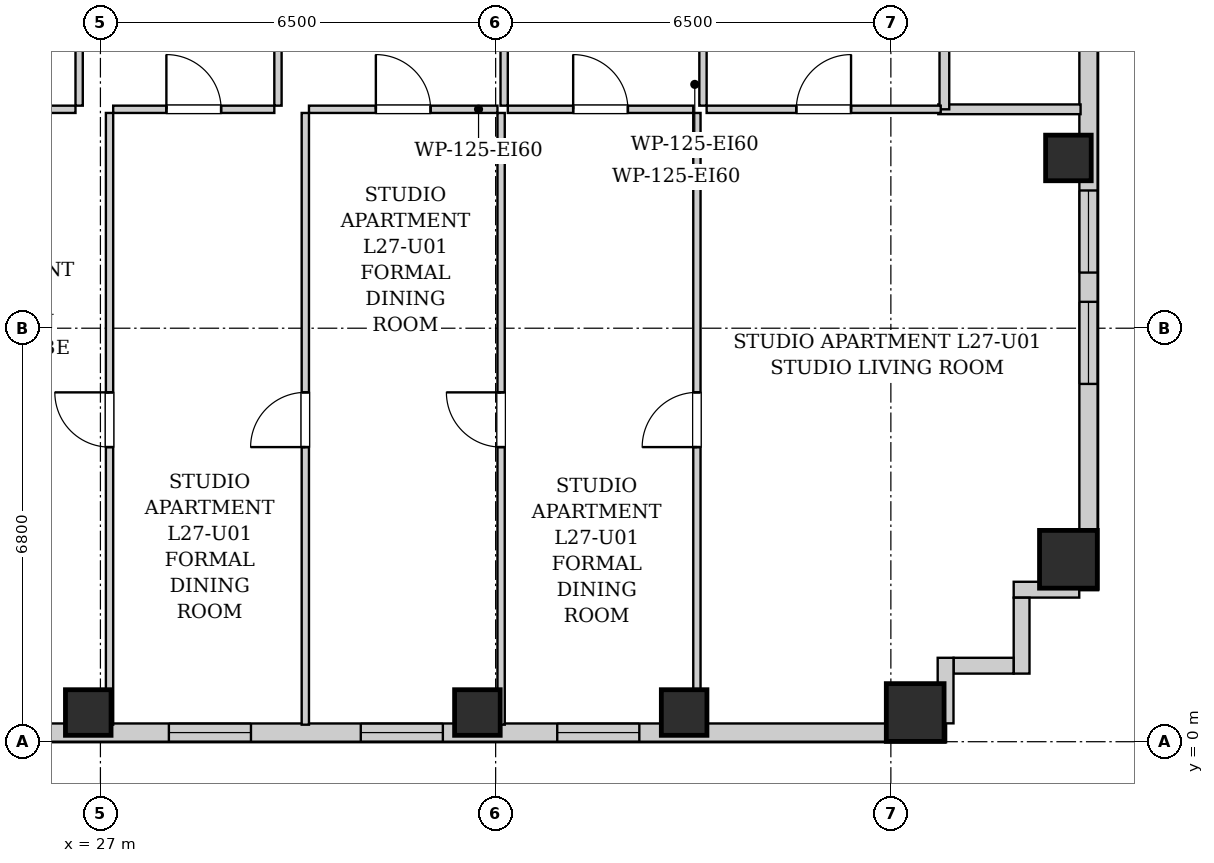
"""IFC4 building model, lengths in metres.
Left out: names, types, materials, properties, quantities, classifications, styles, units other than length and angle.
Written with IfcOpenShell. Run it as: python <this file> out.ifc"""

import sys

from ifc_helpers import new_model, si_unit, direction, frame, frame_2d, origin, origin_2d, place, context, subcontext, project, spatial, rectangle, extrude, element, fill, save


model = new_model("IFC4")
c1 = context("Model", 3, precision=1e-05, world=origin(), true_north=direction((0.0, 1.0)))
c2 = subcontext(c1, "Body", "Model", "MODEL_VIEW")
j1 = project(units=[si_unit("LENGTHUNIT", "METRE"), si_unit("PLANEANGLEUNIT", "RADIAN")], contexts=[c1])
p1 = place(None, origin())
s1 = spatial("IfcSite", under=j1, at=p1, CompositionType="ELEMENT")
p2 = place(p1, origin())
s2 = spatial("IfcBuilding", under=s1, at=p2, CompositionType="ELEMENT")
p3 = place(p2, frame((0.0, 0.0, 97.5)))
s3 = spatial("IfcBuildingStorey", under=s2, at=p3, CompositionType="ELEMENT", Elevation=97.5)
for number, where, z_axis, x_axis in (
    (1, (26.8, 0.48, 0.0), (0.0, 0.0, 1.0), (1.0, 0.0, 0.0)),
    (2, (33.2, 0.48, 0.0), (0.0, 0.0, 1.0), (1.0, 0.0, 0.0)),
    (3, (36.6, 0.48, 0.0), (0.0, 0.0, 1.0), (1.0, 0.0, 0.0)),
):
    element("IfcColumn", number, at=place(p3, frame(where, z_axis=z_axis, x_axis=x_axis)), inside=s3, PredefinedType="COLUMN", context=c2, shape_type="SweptSolid", body=[
        extrude(rectangle(XDim=0.75, YDim=0.75, at=origin_2d()), origin(), (0.0, 0.0, 1.0), 3.2),
    ])
for number, where, z_axis, x_axis in (
    (4, (40.4, 0.48, 0.0), (0.0, 0.0, 1.0), (1.0, 0.0, 0.0)),
    (5, (42.92, 3.0, 0.0), (0.0, 0.0, 1.0), (1.0, 0.0, 0.0)),
):
    element("IfcColumn", number, at=place(p3, frame(where, z_axis=z_axis, x_axis=x_axis)), inside=s3, PredefinedType="COLUMN", context=c2, shape_type="SweptSolid", body=[
        extrude(rectangle(XDim=0.95, YDim=0.95, at=origin_2d()), origin(), (0.0, 0.0, 1.0), 3.2),
    ])
p4 = place(p3, frame((42.92, 9.6, 0.0), z_axis=(0.0, 0.0, 1.0), x_axis=(1.0, 0.0, 0.0)))
e6 = element("IfcColumn", 6, at=p4, inside=s3, PredefinedType="COLUMN", context=c2, shape_type="SweptSolid", body=[
    extrude(rectangle(XDim=0.75, YDim=0.75, at=origin_2d()), origin(), (0.0, 0.0, 1.0), 3.2),
])
p5 = place(p3, frame((43.25, 24.6, 0.0), z_axis=(0.0, 0.0, 1.0), x_axis=(0.0, -1.0, 0.0)))
e7 = element("IfcWall", 7, at=p5, inside=s3, PredefinedType="SOLIDWALL", context=c2, shape_type="SweptSolid", body=[
    extrude(rectangle(XDim=22.1, YDim=0.3, at=frame_2d((11.05, 0.0))), origin(), (0.0, 0.0, 1.0), 2.94),
])
p6 = place(p5, frame((17.366, 0.0, 0.55)))
e8 = element("IfcOpeningElement", 8, at=p6, cuts=e7, PredefinedType="OPENING", context=c2, shape_type="SweptSolid", body=[
    extrude(rectangle(XDim=1.35, YDim=1.2, at=frame_2d((0.675, 0.6))), frame((0.0, 0.16, 0.0), z_axis=(0.0, -1.0, 0.0), x_axis=(1.0, 0.0, 0.0)), (0.0, 0.0, 1.0), 0.32),
])
p7 = place(p5, frame((15.535, 0.0, 0.55)))
e9 = element("IfcOpeningElement", 9, at=p7, cuts=e7, PredefinedType="OPENING", context=c2, shape_type="SweptSolid", body=[
    extrude(rectangle(XDim=1.35, YDim=1.2, at=frame_2d((0.675, 0.6))), frame((0.0, 0.16, 0.0), z_axis=(0.0, -1.0, 0.0), x_axis=(1.0, 0.0, 0.0)), (0.0, 0.0, 1.0), 0.32),
])
p8 = place(p3, frame((40.9, 0.15, 0.0), z_axis=(0.0, 0.0, 1.0), x_axis=(-1.0, 0.0, 0.0)))
e10 = element("IfcWall", 10, at=p8, inside=s3, PredefinedType="SOLIDWALL", context=c2, shape_type="SweptSolid", body=[
    extrude(rectangle(XDim=24.35, YDim=0.3, at=frame_2d((12.175, 0.0))), origin(), (0.0, 0.0, 1.0), 2.94),
])
p9 = place(p8, frame((21.119, 0.0, 0.55)))
e11 = element("IfcOpeningElement", 11, at=p9, cuts=e10, PredefinedType="OPENING", context=c2, shape_type="SweptSolid", body=[
    extrude(rectangle(XDim=1.35, YDim=1.2, at=frame_2d((0.675, 0.6))), frame((0.0, 0.16, 0.0), z_axis=(0.0, -1.0, 0.0), x_axis=(1.0, 0.0, 0.0)), (0.0, 0.0, 1.0), 0.32),
])
p10 = place(p8, frame((18.4, 0.0, 0.55)))
e12 = element("IfcOpeningElement", 12, at=p10, cuts=e10, PredefinedType="OPENING", context=c2, shape_type="SweptSolid", body=[
    extrude(rectangle(XDim=1.35, YDim=1.2, at=frame_2d((0.675, 0.6))), frame((0.0, 0.16, 0.0), z_axis=(0.0, -1.0, 0.0), x_axis=(1.0, 0.0, 0.0)), (0.0, 0.0, 1.0), 0.32),
])
p11 = place(p8, frame((11.424, 0.0, 0.55)))
e13 = element("IfcOpeningElement", 13, at=p11, cuts=e10, PredefinedType="OPENING", context=c2, shape_type="SweptSolid", body=[
    extrude(rectangle(XDim=1.35, YDim=1.2, at=frame_2d((0.675, 0.6))), frame((0.0, 0.16, 0.0), z_axis=(0.0, -1.0, 0.0), x_axis=(1.0, 0.0, 0.0)), (0.0, 0.0, 1.0), 0.32),
])
p12 = place(p8, frame((8.268, 0.0, 0.55)))
e14 = element("IfcOpeningElement", 14, at=p12, cuts=e10, PredefinedType="OPENING", context=c2, shape_type="SweptSolid", body=[
    extrude(rectangle(XDim=1.35, YDim=1.2, at=frame_2d((0.675, 0.6))), frame((0.0, 0.16, 0.0), z_axis=(0.0, -1.0, 0.0), x_axis=(1.0, 0.0, 0.0)), (0.0, 0.0, 1.0), 0.32),
])
p13 = place(p8, frame((5.037, 0.0, 0.55)))
e15 = element("IfcOpeningElement", 15, at=p13, cuts=e10, PredefinedType="OPENING", context=c2, shape_type="SweptSolid", body=[
    extrude(rectangle(XDim=1.35, YDim=1.2, at=frame_2d((0.675, 0.6))), frame((0.0, 0.16, 0.0), z_axis=(0.0, -1.0, 0.0), x_axis=(1.0, 0.0, 0.0)), (0.0, 0.0, 1.0), 0.32),
])
p14 = place(p3, frame((43.098, 2.5, 0.0), z_axis=(0.0, 0.0, 1.0), x_axis=(-1.0, 0.0, 0.0)))
e16 = element("IfcWall", 16, at=p14, inside=s3, PredefinedType="SOLIDWALL", context=c2, shape_type="SweptSolid", body=[
    extrude(rectangle(XDim=1.078, YDim=0.26, at=frame_2d((0.539, 0.0))), origin(), (0.0, 0.0, 1.0), 2.94),
])
p15 = place(p3, frame((42.15, 2.368, 0.0), z_axis=(0.0, 0.0, 1.0), x_axis=(0.0, -1.0, 0.0)))
e17 = element("IfcWall", 17, at=p15, inside=s3, PredefinedType="SOLIDWALL", context=c2, shape_type="SweptSolid", body=[
    extrude(rectangle(XDim=1.248, YDim=0.26, at=frame_2d((0.624, 0.0))), origin(), (0.0, 0.0, 1.0), 2.94),
])
p16 = place(p3, frame((42.018, 1.25, 0.0), z_axis=(0.0, 0.0, 1.0), x_axis=(-1.0, 0.0, 0.0)))
e18 = element("IfcWall", 18, at=p16, inside=s3, PredefinedType="SOLIDWALL", context=c2, shape_type="SweptSolid", body=[
    extrude(rectangle(XDim=0.986, YDim=0.26, at=frame_2d((0.493, 0.0))), origin(), (0.0, 0.0, 1.0), 2.94),
])
p17 = place(p3, frame((40.9, 1.38, 0.0), z_axis=(0.0, 0.0, 1.0), x_axis=(0.0, -1.0, 0.0)))
e19 = element("IfcWall", 19, at=p17, inside=s3, PredefinedType="SOLIDWALL", context=c2, shape_type="SweptSolid", body=[
    extrude(rectangle(XDim=1.078, YDim=0.26, at=frame_2d((0.539, 0.0))), origin(), (0.0, 0.0, 1.0), 2.94),
])
p18 = place(p3, frame((40.78, 10.4, 0.0), z_axis=(0.0, 0.0, 1.0), x_axis=(1.0, 0.0, 0.0)))
e20 = element("IfcWall", 20, at=p18, inside=s3, PredefinedType="PARTITIONING", context=c2, shape_type="SweptSolid", body=[
    extrude(rectangle(XDim=2.34, YDim=0.16, at=frame_2d((1.17, 0.0))), origin(), (0.0, 0.0, 1.0), 2.94),
])
p19 = place(p3, frame((40.88, 10.4, 0.0), z_axis=(0.0, 0.0, 1.0), x_axis=(0.0, 1.0, 0.0)))
e21 = element("IfcWall", 21, at=p19, inside=s3, PredefinedType="PARTITIONING", context=c2, shape_type="SweptSolid", body=[
    extrude(rectangle(XDim=2.91, YDim=0.16, at=frame_2d((1.455, 0.0))), origin(), (0.0, 0.0, 1.0), 2.94),
])
p20 = place(p3, frame((26.65, 10.46, 0.0), z_axis=(0.0, 0.0, 1.0), x_axis=(0.0, 1.0, 0.0)))
e22 = element("IfcWall", 22, at=p20, inside=s3, PredefinedType="PARTITIONING", context=c2, shape_type="SweptSolid", body=[
    extrude(rectangle(XDim=2.85, YDim=0.12, at=frame_2d((1.425, 0.0))), origin(), (0.0, 0.0, 1.0), 2.94),
])
p21 = place(p20, frame((0.975, 0.0, 0.0)))
e23 = element("IfcOpeningElement", 23, at=p21, cuts=e22, PredefinedType="OPENING", context=c2, shape_type="SweptSolid", body=[
    extrude(rectangle(XDim=0.9, YDim=2.05, at=frame_2d((0.45, 1.025))), frame((0.0, 0.07, 0.0), z_axis=(0.0, -1.0, 0.0), x_axis=(1.0, 0.0, 0.0)), (0.0, 0.0, 1.0), 0.14),
])
p22 = place(p3, frame((23.99, 10.4, 0.0), z_axis=(0.0, 0.0, 1.0), x_axis=(1.0, 0.0, 0.0)))
e24 = element("IfcWall", 24, at=p22, inside=s3, PredefinedType="PARTITIONING", context=c2, shape_type="SweptSolid", body=[
    extrude(rectangle(XDim=2.6, YDim=0.12, at=frame_2d((1.3, 0.0))), origin(), (0.0, 0.0, 1.0), 2.94),
])
p23 = place(p22, frame((0.85, 0.0, 0.0)))
e25 = element("IfcOpeningElement", 25, at=p23, cuts=e24, PredefinedType="OPENING", context=c2, shape_type="SweptSolid", body=[
    extrude(rectangle(XDim=0.9, YDim=2.05, at=frame_2d((0.45, 1.025))), frame((0.0, 0.07, 0.0), z_axis=(0.0, -1.0, 0.0), x_axis=(1.0, 0.0, 0.0)), (0.0, 0.0, 1.0), 0.14),
])
p24 = place(p3, frame((29.92, 10.46, 0.0), z_axis=(0.0, 0.0, 1.0), x_axis=(0.0, 1.0, 0.0)))
e26 = element("IfcWall", 26, at=p24, inside=s3, PredefinedType="PARTITIONING", context=c2, shape_type="SweptSolid", body=[
    extrude(rectangle(XDim=2.85, YDim=0.12, at=frame_2d((1.425, 0.0))), origin(), (0.0, 0.0, 1.0), 2.94),
])
p25 = place(p24, frame((0.975, 0.0, 0.0)))
e27 = element("IfcOpeningElement", 27, at=p25, cuts=e26, PredefinedType="OPENING", context=c2, shape_type="SweptSolid", body=[
    extrude(rectangle(XDim=0.9, YDim=2.05, at=frame_2d((0.45, 1.025))), frame((0.0, 0.07, 0.0), z_axis=(0.0, -1.0, 0.0), x_axis=(1.0, 0.0, 0.0)), (0.0, 0.0, 1.0), 0.14),
])
p26 = place(p3, frame((27.21, 10.4, 0.0), z_axis=(0.0, 0.0, 1.0), x_axis=(1.0, 0.0, 0.0)))
e28 = element("IfcWall", 28, at=p26, inside=s3, PredefinedType="PARTITIONING", context=c2, shape_type="SweptSolid", body=[
    extrude(rectangle(XDim=2.65, YDim=0.12, at=frame_2d((1.325, 0.0))), origin(), (0.0, 0.0, 1.0), 2.94),
])
p27 = place(p26, frame((0.875, 0.0, 0.0)))
e29 = element("IfcOpeningElement", 29, at=p27, cuts=e28, PredefinedType="OPENING", context=c2, shape_type="SweptSolid", body=[
    extrude(rectangle(XDim=0.9, YDim=2.05, at=frame_2d((0.45, 1.025))), frame((0.0, 0.07, 0.0), z_axis=(0.0, -1.0, 0.0), x_axis=(1.0, 0.0, 0.0)), (0.0, 0.0, 1.0), 0.14),
])
p28 = place(p3, frame((33.64, 10.46, 0.0), z_axis=(0.0, 0.0, 1.0), x_axis=(0.0, 1.0, 0.0)))
e30 = element("IfcWall", 30, at=p28, inside=s3, PredefinedType="PARTITIONING", context=c2, shape_type="SweptSolid", body=[
    extrude(rectangle(XDim=2.85, YDim=0.12, at=frame_2d((1.425, 0.0))), origin(), (0.0, 0.0, 1.0), 2.94),
])
p29 = place(p28, frame((0.975, 0.0, 0.0)))
e31 = element("IfcOpeningElement", 31, at=p29, cuts=e30, PredefinedType="OPENING", context=c2, shape_type="SweptSolid", body=[
    extrude(rectangle(XDim=0.9, YDim=2.05, at=frame_2d((0.45, 1.025))), frame((0.0, 0.07, 0.0), z_axis=(0.0, -1.0, 0.0), x_axis=(1.0, 0.0, 0.0)), (0.0, 0.0, 1.0), 0.14),
])
p30 = place(p3, frame((30.43, 10.4, 0.0), z_axis=(0.0, 0.0, 1.0), x_axis=(1.0, 0.0, 0.0)))
e32 = element("IfcWall", 32, at=p30, inside=s3, PredefinedType="PARTITIONING", context=c2, shape_type="SweptSolid", body=[
    extrude(rectangle(XDim=3.1, YDim=0.12, at=frame_2d((1.55, 0.0))), origin(), (0.0, 0.0, 1.0), 2.94),
])
p31 = place(p30, frame((1.1, 0.0, 0.0)))
e33 = element("IfcOpeningElement", 33, at=p31, cuts=e32, PredefinedType="OPENING", context=c2, shape_type="SweptSolid", body=[
    extrude(rectangle(XDim=0.9, YDim=2.05, at=frame_2d((0.45, 1.025))), frame((0.0, 0.07, 0.0), z_axis=(0.0, -1.0, 0.0), x_axis=(1.0, 0.0, 0.0)), (0.0, 0.0, 1.0), 0.14),
])
p32 = place(p3, frame((36.91, 10.46, 0.0), z_axis=(0.0, 0.0, 1.0), x_axis=(0.0, 1.0, 0.0)))
e34 = element("IfcWall", 34, at=p32, inside=s3, PredefinedType="PARTITIONING", context=c2, shape_type="SweptSolid", body=[
    extrude(rectangle(XDim=2.85, YDim=0.12, at=frame_2d((1.425, 0.0))), origin(), (0.0, 0.0, 1.0), 2.94),
])
p33 = place(p32, frame((0.975, 0.0, 0.0)))
e35 = element("IfcOpeningElement", 35, at=p33, cuts=e34, PredefinedType="OPENING", context=c2, shape_type="SweptSolid", body=[
    extrude(rectangle(XDim=0.9, YDim=2.05, at=frame_2d((0.45, 1.025))), frame((0.0, 0.07, 0.0), z_axis=(0.0, -1.0, 0.0), x_axis=(1.0, 0.0, 0.0)), (0.0, 0.0, 1.0), 0.14),
])
p34 = place(p3, frame((33.7, 10.4, 0.0), z_axis=(0.0, 0.0, 1.0), x_axis=(1.0, 0.0, 0.0)))
e36 = element("IfcWall", 36, at=p34, inside=s3, PredefinedType="PARTITIONING", context=c2, shape_type="SweptSolid", body=[
    extrude(rectangle(XDim=3.05, YDim=0.12, at=frame_2d((1.525, 0.0))), origin(), (0.0, 0.0, 1.0), 2.94),
])
p35 = place(p34, frame((1.075, 0.0, 0.0)))
e37 = element("IfcOpeningElement", 37, at=p35, cuts=e36, PredefinedType="OPENING", context=c2, shape_type="SweptSolid", body=[
    extrude(rectangle(XDim=0.9, YDim=2.05, at=frame_2d((0.45, 1.025))), frame((0.0, 0.07, 0.0), z_axis=(0.0, -1.0, 0.0), x_axis=(1.0, 0.0, 0.0)), (0.0, 0.0, 1.0), 0.14),
])
p36 = place(p3, frame((36.97, 10.4, 0.0), z_axis=(0.0, 0.0, 1.0), x_axis=(1.0, 0.0, 0.0)))
e38 = element("IfcWall", 38, at=p36, inside=s3, PredefinedType="PARTITIONING", context=c2, shape_type="SweptSolid", body=[
    extrude(rectangle(XDim=3.85, YDim=0.12, at=frame_2d((1.925, 0.0))), origin(), (0.0, 0.0, 1.0), 2.94),
])
p37 = place(p36, frame((1.475, 0.0, 0.0)))
e39 = element("IfcOpeningElement", 39, at=p37, cuts=e38, PredefinedType="OPENING", context=c2, shape_type="SweptSolid", body=[
    extrude(rectangle(XDim=0.9, YDim=2.05, at=frame_2d((0.45, 1.025))), frame((0.0, 0.07, 0.0), z_axis=(0.0, -1.0, 0.0), x_axis=(1.0, 0.0, 0.0)), (0.0, 0.0, 1.0), 0.14),
])
p38 = place(p3, frame((27.15, 0.28, 0.0), z_axis=(0.0, 0.0, 1.0), x_axis=(0.0, 1.0, 0.0)))
e40 = element("IfcWall", 40, at=p38, inside=s3, PredefinedType="PARTITIONING", context=c2, shape_type="SweptSolid", body=[
    extrude(rectangle(XDim=10.06, YDim=0.12, at=frame_2d((5.03, 0.0))), origin(), (0.0, 0.0, 1.0), 2.94),
])
p39 = place(p38, frame((4.565, 0.0, 0.0)))
e41 = element("IfcOpeningElement", 41, at=p39, cuts=e40, PredefinedType="OPENING", context=c2, shape_type="SweptSolid", body=[
    extrude(rectangle(XDim=0.9, YDim=2.05, at=frame_2d((0.45, 1.025))), frame((0.0, 0.07, 0.0), z_axis=(0.0, -1.0, 0.0), x_axis=(1.0, 0.0, 0.0)), (0.0, 0.0, 1.0), 0.14),
])
p40 = place(p3, frame((30.37, 0.28, 0.0), z_axis=(0.0, 0.0, 1.0), x_axis=(0.0, 1.0, 0.0)))
e42 = element("IfcWall", 42, at=p40, inside=s3, PredefinedType="PARTITIONING", context=c2, shape_type="SweptSolid", body=[
    extrude(rectangle(XDim=10.06, YDim=0.12, at=frame_2d((5.03, 0.0))), origin(), (0.0, 0.0, 1.0), 2.94),
])
p41 = place(p40, frame((4.565, 0.0, 0.0)))
e43 = element("IfcOpeningElement", 43, at=p41, cuts=e42, PredefinedType="OPENING", context=c2, shape_type="SweptSolid", body=[
    extrude(rectangle(XDim=0.9, YDim=2.05, at=frame_2d((0.45, 1.025))), frame((0.0, 0.07, 0.0), z_axis=(0.0, -1.0, 0.0), x_axis=(1.0, 0.0, 0.0)), (0.0, 0.0, 1.0), 0.14),
])
p42 = place(p3, frame((33.59, 0.28, 0.0), z_axis=(0.0, 0.0, 1.0), x_axis=(0.0, 1.0, 0.0)))
e44 = element("IfcWall", 44, at=p42, inside=s3, PredefinedType="PARTITIONING", context=c2, shape_type="SweptSolid", body=[
    extrude(rectangle(XDim=10.06, YDim=0.12, at=frame_2d((5.03, 0.0))), origin(), (0.0, 0.0, 1.0), 2.94),
])
p43 = place(p42, frame((4.565, 0.0, 0.0)))
e45 = element("IfcOpeningElement", 45, at=p43, cuts=e44, PredefinedType="OPENING", context=c2, shape_type="SweptSolid", body=[
    extrude(rectangle(XDim=0.9, YDim=2.05, at=frame_2d((0.45, 1.025))), frame((0.0, 0.07, 0.0), z_axis=(0.0, -1.0, 0.0), x_axis=(1.0, 0.0, 0.0)), (0.0, 0.0, 1.0), 0.14),
])
p44 = place(p3, frame((36.81, 0.28, 0.0), z_axis=(0.0, 0.0, 1.0), x_axis=(0.0, 1.0, 0.0)))
e46 = element("IfcWall", 46, at=p44, inside=s3, PredefinedType="PARTITIONING", context=c2, shape_type="SweptSolid", body=[
    extrude(rectangle(XDim=10.06, YDim=0.12, at=frame_2d((5.03, 0.0))), origin(), (0.0, 0.0, 1.0), 2.94),
])
p45 = place(p44, frame((4.565, 0.0, 0.0)))
e47 = element("IfcOpeningElement", 47, at=p45, cuts=e46, PredefinedType="OPENING", context=c2, shape_type="SweptSolid", body=[
    extrude(rectangle(XDim=0.9, YDim=2.05, at=frame_2d((0.45, 1.025))), frame((0.0, 0.07, 0.0), z_axis=(0.0, -1.0, 0.0), x_axis=(1.0, 0.0, 0.0)), (0.0, 0.0, 1.0), 0.14),
])
p46 = place(p27, origin())
e48 = element("IfcDoor", 48, at=p46, inside=s3, OperationType="SINGLE_SWING_LEFT", PredefinedType="DOOR", context=c2, shape_type="SweptSolid", body=[
    extrude(rectangle(XDim=0.9, YDim=2.05, at=frame_2d((0.45, 1.025))), frame((0.0, 0.025, 0.0), z_axis=(0.0, -1.0, 0.0), x_axis=(1.0, 0.0, 0.0)), (0.0, 0.0, 1.0), 0.05),
])
fill(e29, e48)
p47 = place(p31, origin())
e49 = element("IfcDoor", 49, at=p47, inside=s3, OperationType="SINGLE_SWING_LEFT", PredefinedType="DOOR", context=c2, shape_type="SweptSolid", body=[
    extrude(rectangle(XDim=0.9, YDim=2.05, at=frame_2d((0.45, 1.025))), frame((0.0, 0.025, 0.0), z_axis=(0.0, -1.0, 0.0), x_axis=(1.0, 0.0, 0.0)), (0.0, 0.0, 1.0), 0.05),
])
fill(e33, e49)
p48 = place(p35, origin())
e50 = element("IfcDoor", 50, at=p48, inside=s3, OperationType="SINGLE_SWING_LEFT", PredefinedType="DOOR", context=c2, shape_type="SweptSolid", body=[
    extrude(rectangle(XDim=0.9, YDim=2.05, at=frame_2d((0.45, 1.025))), frame((0.0, 0.025, 0.0), z_axis=(0.0, -1.0, 0.0), x_axis=(1.0, 0.0, 0.0)), (0.0, 0.0, 1.0), 0.05),
])
fill(e37, e50)
p49 = place(p37, origin())
e51 = element("IfcDoor", 51, at=p49, inside=s3, OperationType="SINGLE_SWING_RIGHT", PredefinedType="DOOR", context=c2, shape_type="SweptSolid", body=[
    extrude(rectangle(XDim=0.9, YDim=2.05, at=frame_2d((0.45, 1.025))), frame((0.0, 0.025, 0.0), z_axis=(0.0, -1.0, 0.0), x_axis=(1.0, 0.0, 0.0)), (0.0, 0.0, 1.0), 0.05),
])
fill(e39, e51)
p50 = place(p39, origin())
e52 = element("IfcDoor", 52, at=p50, inside=s3, OperationType="SINGLE_SWING_RIGHT", PredefinedType="DOOR", context=c2, shape_type="SweptSolid", body=[
    extrude(rectangle(XDim=0.9, YDim=2.05, at=frame_2d((0.45, 1.025))), frame((0.0, 0.025, 0.0), z_axis=(0.0, -1.0, 0.0), x_axis=(1.0, 0.0, 0.0)), (0.0, 0.0, 1.0), 0.05),
])
fill(e41, e52)
p51 = place(p41, origin())
e53 = element("IfcDoor", 53, at=p51, inside=s3, OperationType="SINGLE_SWING_LEFT", PredefinedType="DOOR", context=c2, shape_type="SweptSolid", body=[
    extrude(rectangle(XDim=0.9, YDim=2.05, at=frame_2d((0.45, 1.025))), frame((0.0, 0.025, 0.0), z_axis=(0.0, -1.0, 0.0), x_axis=(1.0, 0.0, 0.0)), (0.0, 0.0, 1.0), 0.05),
])
fill(e43, e53)
p52 = place(p43, origin())
e54 = element("IfcDoor", 54, at=p52, inside=s3, OperationType="SINGLE_SWING_RIGHT", PredefinedType="DOOR", context=c2, shape_type="SweptSolid", body=[
    extrude(rectangle(XDim=0.9, YDim=2.05, at=frame_2d((0.45, 1.025))), frame((0.0, 0.025, 0.0), z_axis=(0.0, -1.0, 0.0), x_axis=(1.0, 0.0, 0.0)), (0.0, 0.0, 1.0), 0.05),
])
fill(e45, e54)
p53 = place(p45, origin())
e55 = element("IfcDoor", 55, at=p53, inside=s3, OperationType="SINGLE_SWING_LEFT", PredefinedType="DOOR", context=c2, shape_type="SweptSolid", body=[
    extrude(rectangle(XDim=0.9, YDim=2.05, at=frame_2d((0.45, 1.025))), frame((0.0, 0.025, 0.0), z_axis=(0.0, -1.0, 0.0), x_axis=(1.0, 0.0, 0.0)), (0.0, 0.0, 1.0), 0.05),
])
fill(e47, e55)
p54 = place(p11, origin())
e56 = element("IfcWindow", 56, at=p54, inside=s3, PartitioningType="SINGLE_PANEL", PredefinedType="WINDOW", context=c2, shape_type="SweptSolid", body=[
    extrude(rectangle(XDim=1.35, YDim=1.2, at=frame_2d((0.675, 0.6))), frame((0.0, 0.03, 0.0), z_axis=(0.0, -1.0, 0.0), x_axis=(1.0, 0.0, 0.0)), (0.0, 0.0, 1.0), 0.06),
])
fill(e13, e56)
p55 = place(p12, origin())
e57 = element("IfcWindow", 57, at=p55, inside=s3, PartitioningType="SINGLE_PANEL", PredefinedType="WINDOW", context=c2, shape_type="SweptSolid", body=[
    extrude(rectangle(XDim=1.35, YDim=1.2, at=frame_2d((0.675, 0.6))), frame((0.0, 0.03, 0.0), z_axis=(0.0, -1.0, 0.0), x_axis=(1.0, 0.0, 0.0)), (0.0, 0.0, 1.0), 0.06),
])
fill(e14, e57)
p56 = place(p13, origin())
e58 = element("IfcWindow", 58, at=p56, inside=s3, PartitioningType="SINGLE_PANEL", PredefinedType="WINDOW", context=c2, shape_type="SweptSolid", body=[
    extrude(rectangle(XDim=1.35, YDim=1.2, at=frame_2d((0.675, 0.6))), frame((0.0, 0.03, 0.0), z_axis=(0.0, -1.0, 0.0), x_axis=(1.0, 0.0, 0.0)), (0.0, 0.0, 1.0), 0.06),
])
fill(e15, e58)
p57 = place(p6, origin())
e59 = element("IfcWindow", 59, at=p57, inside=s3, PartitioningType="SINGLE_PANEL", PredefinedType="WINDOW", context=c2, shape_type="SweptSolid", body=[
    extrude(rectangle(XDim=1.35, YDim=1.2, at=frame_2d((0.675, 0.6))), frame((0.0, 0.03, 0.0), z_axis=(0.0, -1.0, 0.0), x_axis=(1.0, 0.0, 0.0)), (0.0, 0.0, 1.0), 0.06),
])
fill(e8, e59)
p58 = place(p7, origin())
e60 = element("IfcWindow", 60, at=p58, inside=s3, PartitioningType="SINGLE_PANEL", PredefinedType="WINDOW", context=c2, shape_type="SweptSolid", body=[
    extrude(rectangle(XDim=1.35, YDim=1.2, at=frame_2d((0.675, 0.6))), frame((0.0, 0.03, 0.0), z_axis=(0.0, -1.0, 0.0), x_axis=(1.0, 0.0, 0.0)), (0.0, 0.0, 1.0), 0.06),
])
fill(e9, e60)
save(model, sys.argv[1])
